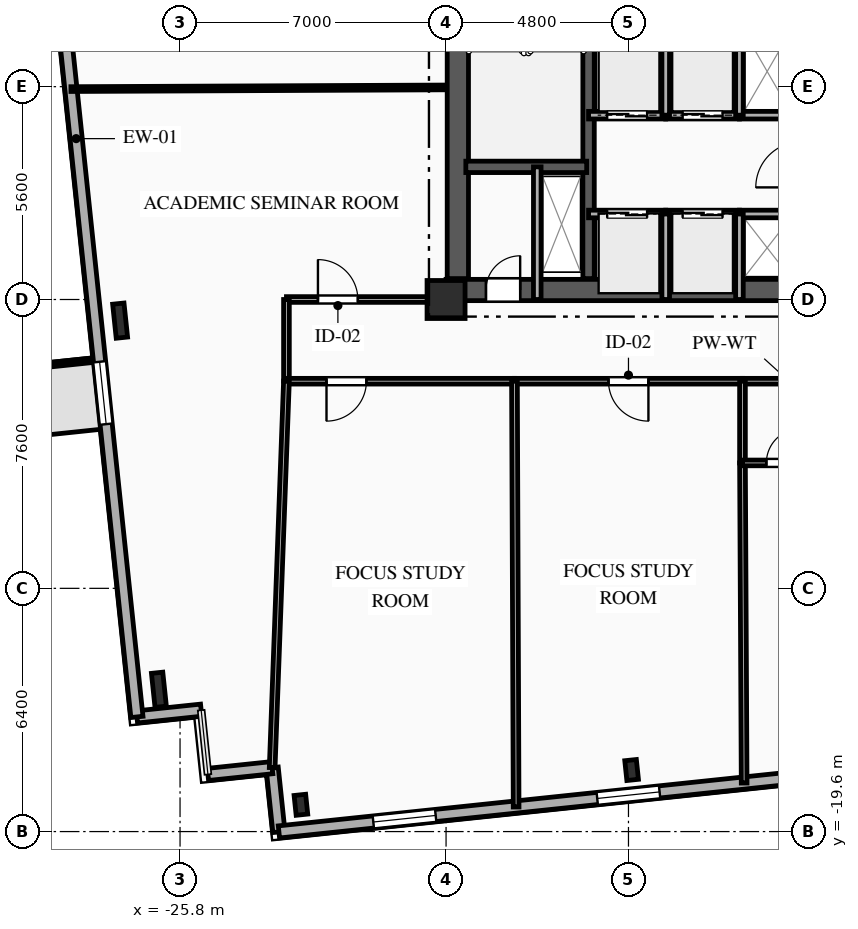
"""IFC4 building model, lengths in metres.
Left out: names, types, materials, properties, quantities, classifications, styles, units other than length and angle.
Written with IfcOpenShell. Run it as: python <this file> out.ifc"""

import sys

from ifc_helpers import new_model, si_unit, direction, frame, frame_2d, origin, origin_2d, place, context, subcontext, project, spatial, rectangle, i_section, extrude, element, fill, save


model = new_model("IFC4")
c1 = context("Model", 3, precision=1e-05, world=origin(), true_north=direction((0.0, 1.0)))
c2 = subcontext(c1, "Body", "Model", "MODEL_VIEW")
j1 = project(units=[si_unit("LENGTHUNIT", "METRE"), si_unit("PLANEANGLEUNIT", "RADIAN")], contexts=[c1])
p1 = place(None, origin())
s1 = spatial("IfcSite", under=j1, at=p1, CompositionType="ELEMENT")
p2 = place(p1, origin())
s2 = spatial("IfcBuilding", under=s1, at=p2, CompositionType="ELEMENT")
p3 = place(p2, frame((0.0, 0.0, 109.15)))
s3 = spatial("IfcBuildingStorey", under=s2, at=p3, CompositionType="ELEMENT", Elevation=109.15)
p4 = place(p3, frame((-18.8, -5.6, 0.0), z_axis=(0.0, 0.0, 1.0), x_axis=(1.0, 0.0, 0.0)))
e1 = element("IfcColumn", 1, at=p4, inside=s3, PredefinedType="COLUMN", context=c2, shape_type="SweptSolid", body=[
    extrude(rectangle(XDim=1.0, YDim=1.0, at=origin_2d()), origin(), (0.0, 0.0, 1.0), 3.35),
])
for number, where, z_axis, x_axis in (
    (2, (-22.619, -18.895, 0.0), (0.0, 0.0, 1.0), (0.995, 0.105, 0.0)),
    (3, (-13.917, -17.98, 0.0), (0.0, 0.0, 1.0), (0.995, 0.105, 0.0)),
):
    element("IfcColumn", number, at=place(p3, frame(where, z_axis=z_axis, x_axis=x_axis)), inside=s3, PredefinedType="COLUMN", context=c2, shape_type="SweptSolid", body=[
        extrude(i_section(OverallWidth=0.306, OverallDepth=0.524, WebThickness=0.021, FlangeThickness=0.04, FilletRadius=0.027, at=origin_2d()), origin(), (0.0, 0.0, 1.0), 3.35),
    ])
for number, where, z_axis, x_axis in (
    (4, (-27.377, -6.156, 0.0), (0.0, 0.0, 1.0), (0.995, 0.105, 0.0)),
    (5, (-26.356, -15.869, 0.0), (0.0, 0.0, 1.0), (0.995, 0.105, 0.0)),
):
    element("IfcColumn", number, at=place(p3, frame(where, z_axis=z_axis, x_axis=x_axis)), inside=s3, PredefinedType="COLUMN", context=c2, shape_type="SweptSolid", body=[
        extrude(i_section(OverallWidth=0.3, OverallDepth=0.9, WebThickness=0.019, FlangeThickness=0.035, FilletRadius=0.03, at=origin_2d()), origin(), (0.0, 0.0, 1.0), 3.35),
    ])
for number, where, z_axis, x_axis in (
    (6, (-23.198, -19.609, 0.0), (0.0, 0.0, 1.0), (-0.105, 0.995, 0.0)),
    (7, (-23.376, -17.919, 0.0), (0.0, 0.0, 1.0), (-0.995, -0.105, 0.0)),
):
    element("IfcWall", number, at=place(p3, frame(where, z_axis=z_axis, x_axis=x_axis)), inside=s3, PredefinedType="SOLIDWALL", context=c2, shape_type="SweptSolid", body=[
        extrude(rectangle(XDim=1.7, YDim=0.32, at=frame_2d((0.85, 0.0))), origin(), (0.0, 0.0, 1.0), 3.045),
    ])
p5 = place(p3, frame((-25.244, -16.406, 0.0), z_axis=(0.0, 0.0, 1.0), x_axis=(-0.994521177842, -0.104535289845, 0.0)))
e8 = element("IfcWall", 8, at=p5, inside=s3, PredefinedType="SOLIDWALL", context=c2, shape_type="SweptSolid", body=[
    extrude(rectangle(XDim=1.7, YDim=0.32, at=frame_2d((0.85, 0.0))), origin(), (0.0, 0.0, 1.0), 3.045),
])
p6 = place(p3, frame((-26.935, -16.583, 0.0), z_axis=(0.0, 0.0, 1.0), x_axis=(-0.104524887486, 0.994522271192, 0.0)))
e9 = element("IfcWall", 9, at=p6, inside=s3, PredefinedType="SOLIDWALL", context=c2, shape_type="SweptSolid", body=[
    extrude(rectangle(XDim=30.6, YDim=0.32, at=frame_2d((15.3, 0.0))), origin(), (0.0, 0.0, 1.0), 3.045),
])
p7 = place(p6, frame((7.746, 0.0, 0.85)))
e10 = element("IfcOpeningElement", 10, at=p7, cuts=e9, PredefinedType="OPENING", context=c2, shape_type="SweptSolid", body=[
    extrude(rectangle(XDim=1.65, YDim=1.85, at=frame_2d((0.825, 0.925))), frame((0.0, 0.17, 0.0), z_axis=(0.0, -1.0, 0.0), x_axis=(1.0, 0.0, 0.0)), (0.0, 0.0, 1.0), 0.34),
])
p8 = place(p6, frame((22.681, 0.0, 0.85)))
e11 = element("IfcOpeningElement", 11, at=p8, cuts=e9, PredefinedType="OPENING", context=c2, shape_type="SweptSolid", body=[
    extrude(rectangle(XDim=1.5, YDim=1.85, at=frame_2d((0.75, 0.925))), frame((0.0, 0.17, 0.0), z_axis=(0.0, -1.0, 0.0), x_axis=(1.0, 0.0, 0.0)), (0.0, 0.0, 1.0), 0.34),
])
p9 = place(p3, frame((30.307, -13.986, 0.0), z_axis=(0.0, 0.0, 1.0), x_axis=(-0.994521628355, -0.104531003701, 0.0)))
e12 = element("IfcWall", 12, at=p9, inside=s3, PredefinedType="SOLIDWALL", context=c2, shape_type="SweptSolid", body=[
    extrude(rectangle(XDim=53.8, YDim=0.32, at=frame_2d((26.9, 0.0))), origin(), (0.0, 0.0, 1.0), 3.045),
])
p10 = place(p9, frame((3.098, 0.0, 0.85)))
e13 = element("IfcOpeningElement", 13, at=p10, cuts=e12, PredefinedType="OPENING", context=c2, shape_type="SweptSolid", body=[
    extrude(rectangle(XDim=1.65, YDim=1.85, at=frame_2d((0.825, 0.925))), frame((0.0, 0.17, 0.0), z_axis=(0.0, -1.0, 0.0), x_axis=(1.0, 0.0, 0.0)), (0.0, 0.0, 1.0), 0.34),
])
p11 = place(p9, frame((9.302, 0.0, 0.85)))
e14 = element("IfcOpeningElement", 14, at=p11, cuts=e12, PredefinedType="OPENING", context=c2, shape_type="SweptSolid", body=[
    extrude(rectangle(XDim=1.65, YDim=1.85, at=frame_2d((0.825, 0.925))), frame((0.0, 0.17, 0.0), z_axis=(0.0, -1.0, 0.0), x_axis=(1.0, 0.0, 0.0)), (0.0, 0.0, 1.0), 0.34),
])
p12 = place(p9, frame((14.827, 0.0, 0.85)))
e15 = element("IfcOpeningElement", 15, at=p12, cuts=e12, PredefinedType="OPENING", context=c2, shape_type="SweptSolid", body=[
    extrude(rectangle(XDim=1.65, YDim=1.85, at=frame_2d((0.825, 0.925))), frame((0.0, 0.17, 0.0), z_axis=(0.0, -1.0, 0.0), x_axis=(1.0, 0.0, 0.0)), (0.0, 0.0, 1.0), 0.34),
])
p13 = place(p9, frame((23.078, 0.0, 0.85)))
e16 = element("IfcOpeningElement", 16, at=p13, cuts=e12, PredefinedType="OPENING", context=c2, shape_type="SweptSolid", body=[
    extrude(rectangle(XDim=2.2, YDim=1.85, at=frame_2d((1.1, 0.925))), frame((0.0, 0.17, 0.0), z_axis=(0.0, -1.0, 0.0), x_axis=(1.0, 0.0, 0.0)), (0.0, 0.0, 1.0), 0.34),
])
p14 = place(p9, frame((34.646, 0.0, 0.85)))
e17 = element("IfcOpeningElement", 17, at=p14, cuts=e12, PredefinedType="OPENING", context=c2, shape_type="SweptSolid", body=[
    extrude(rectangle(XDim=2.2, YDim=1.85, at=frame_2d((1.1, 0.925))), frame((0.0, 0.17, 0.0), z_axis=(0.0, -1.0, 0.0), x_axis=(1.0, 0.0, 0.0)), (0.0, 0.0, 1.0), 0.34),
])
p15 = place(p9, frame((43.728, 0.0, 0.85)))
e18 = element("IfcOpeningElement", 18, at=p15, cuts=e12, PredefinedType="OPENING", context=c2, shape_type="SweptSolid", body=[
    extrude(rectangle(XDim=1.65, YDim=1.85, at=frame_2d((0.825, 0.925))), frame((0.0, 0.17, 0.0), z_axis=(0.0, -1.0, 0.0), x_axis=(1.0, 0.0, 0.0)), (0.0, 0.0, 1.0), 0.34),
])
p16 = place(p9, frame((49.653, 0.0, 0.85)))
e19 = element("IfcOpeningElement", 19, at=p16, cuts=e12, PredefinedType="OPENING", context=c2, shape_type="SweptSolid", body=[
    extrude(rectangle(XDim=1.65, YDim=1.85, at=frame_2d((0.825, 0.925))), frame((0.0, 0.17, 0.0), z_axis=(0.0, -1.0, 0.0), x_axis=(1.0, 0.0, 0.0)), (0.0, 0.0, 1.0), 0.34),
])
p17 = place(p3, frame((-18.8, -5.35, 0.0), z_axis=(0.0, 0.0, 1.0), x_axis=(1.0, 0.0, 0.0)))
e20 = element("IfcWall", 20, at=p17, inside=s3, PredefinedType="SHEAR", context=c2, shape_type="SweptSolid", body=[
    extrude(rectangle(XDim=9.6, YDim=0.56, at=frame_2d((4.8, 0.0))), origin(), (0.0, 0.0, 1.0), 3.045),
])
p18 = place(p17, frame((1.05, 0.0, 0.0)))
e21 = element("IfcOpeningElement", 21, at=p18, cuts=e20, PredefinedType="OPENING", context=c2, shape_type="SweptSolid", body=[
    extrude(rectangle(XDim=0.9, YDim=2.1, at=frame_2d((0.45, 1.05))), frame((0.0, 0.29, 0.0), z_axis=(0.0, -1.0, 0.0), x_axis=(1.0, 0.0, 0.0)), (0.0, 0.0, 1.0), 0.58),
])
p19 = place(p3, frame((-18.49, -5.05, 0.0), z_axis=(0.0, 0.0, 1.0), x_axis=(0.0, 1.0, 0.0)))
e22 = element("IfcWall", 22, at=p19, inside=s3, PredefinedType="SHEAR", context=c2, shape_type="SweptSolid", body=[
    extrude(rectangle(XDim=10.1, YDim=0.56, at=frame_2d((5.05, 0.0))), origin(), (0.0, 0.0, 1.0), 3.045),
])
p20 = place(p3, frame((-15.05, -5.05, 0.0), z_axis=(0.0, 0.0, 1.0), x_axis=(0.0, 1.0, 0.0)))
e23 = element("IfcWall", 23, at=p20, inside=s3, PredefinedType="SHEAR", context=c2, shape_type="SweptSolid", body=[
    extrude(rectangle(XDim=10.1, YDim=0.3, at=frame_2d((5.05, 0.0))), origin(), (0.0, 0.0, 1.0), 3.045),
])
p21 = place(p3, frame((-18.28, -2.11, 0.0), z_axis=(0.0, 0.0, 1.0), x_axis=(1.0, 0.0, 0.0)))
e24 = element("IfcWall", 24, at=p21, inside=s3, PredefinedType="SHEAR", context=c2, shape_type="SweptSolid", body=[
    extrude(rectangle(XDim=3.18, YDim=0.3, at=frame_2d((1.59, 0.0))), origin(), (0.0, 0.0, 1.0), 3.045),
])
p22 = place(p3, frame((-16.4, -5.6, 0.0), z_axis=(0.0, 0.0, 1.0), x_axis=(0.0, 1.0, 0.0)))
e25 = element("IfcWall", 25, at=p22, inside=s3, PredefinedType="PARTITIONING", context=c2, shape_type="SweptSolid", body=[
    extrude(rectangle(XDim=3.49, YDim=0.2, at=frame_2d((1.745, 0.0))), origin(), (0.0, 0.0, 1.0), 3.045),
])
p23 = place(p3, frame((-15.05, -3.35, 0.0), z_axis=(0.0, 0.0, 1.0), x_axis=(1.0, 0.0, 0.0)))
e26 = element("IfcWall", 26, at=p23, inside=s3, PredefinedType="PARTITIONING", context=c2, shape_type="SweptSolid", body=[
    extrude(rectangle(XDim=2.03, YDim=0.2, at=frame_2d((1.015, 0.0))), origin(), (0.0, 0.0, 1.0), 3.045),
])
p24 = place(p23, frame((0.49, 0.0, 0.0)))
e27 = element("IfcOpeningElement", 27, at=p24, cuts=e26, PredefinedType="OPENING", context=c2, shape_type="SweptSolid", body=[
    extrude(rectangle(XDim=1.05, YDim=2.1, at=frame_2d((0.525, 1.05))), frame((0.0, 0.11, 0.0), z_axis=(0.0, -1.0, 0.0), x_axis=(1.0, 0.0, 0.0)), (0.0, 0.0, 1.0), 0.22),
])
p25 = place(p3, frame((-13.02, -3.35, 0.0), z_axis=(0.0, 0.0, 1.0), x_axis=(1.0, 0.0, 0.0)))
e28 = element("IfcWall", 28, at=p25, inside=s3, PredefinedType="PARTITIONING", context=c2, shape_type="SweptSolid", body=[
    extrude(rectangle(XDim=1.94, YDim=0.2, at=frame_2d((0.97, 0.0))), origin(), (0.0, 0.0, 1.0), 3.045),
])
p26 = place(p25, frame((0.445, 0.0, 0.0)))
e29 = element("IfcOpeningElement", 29, at=p26, cuts=e28, PredefinedType="OPENING", context=c2, shape_type="SweptSolid", body=[
    extrude(rectangle(XDim=1.05, YDim=2.1, at=frame_2d((0.525, 1.05))), frame((0.0, 0.11, 0.0), z_axis=(0.0, -1.0, 0.0), x_axis=(1.0, 0.0, 0.0)), (0.0, 0.0, 1.0), 0.22),
])
p27 = place(p3, frame((-11.08, -3.35, 0.0), z_axis=(0.0, 0.0, 1.0), x_axis=(1.0, 0.0, 0.0)))
e30 = element("IfcWall", 30, at=p27, inside=s3, PredefinedType="PARTITIONING", context=c2, shape_type="SweptSolid", body=[
    extrude(rectangle(XDim=1.88, YDim=0.2, at=frame_2d((0.94, 0.0))), origin(), (0.0, 0.0, 1.0), 2.76),
])
p28 = place(p3, frame((-13.02, -0.75, 0.0), z_axis=(0.0, 0.0, 1.0), x_axis=(-1.0, 0.0, 0.0)))
e31 = element("IfcWall", 31, at=p28, inside=s3, PredefinedType="PARTITIONING", context=c2, shape_type="SweptSolid", body=[
    extrude(rectangle(XDim=2.03, YDim=0.2, at=frame_2d((1.015, 0.0))), origin(), (0.0, 0.0, 1.0), 3.045),
])
p29 = place(p28, frame((0.49, 0.0, 0.0)))
e32 = element("IfcOpeningElement", 32, at=p29, cuts=e31, PredefinedType="OPENING", context=c2, shape_type="SweptSolid", body=[
    extrude(rectangle(XDim=1.05, YDim=2.1, at=frame_2d((0.525, 1.05))), frame((0.0, 0.11, 0.0), z_axis=(0.0, -1.0, 0.0), x_axis=(1.0, 0.0, 0.0)), (0.0, 0.0, 1.0), 0.22),
])
p30 = place(p3, frame((-11.08, -0.75, 0.0), z_axis=(0.0, 0.0, 1.0), x_axis=(-1.0, 0.0, 0.0)))
e33 = element("IfcWall", 33, at=p30, inside=s3, PredefinedType="PARTITIONING", context=c2, shape_type="SweptSolid", body=[
    extrude(rectangle(XDim=1.94, YDim=0.2, at=frame_2d((0.97, 0.0))), origin(), (0.0, 0.0, 1.0), 3.045),
])
p31 = place(p30, frame((0.445, 0.0, 0.0)))
e34 = element("IfcOpeningElement", 34, at=p31, cuts=e33, PredefinedType="OPENING", context=c2, shape_type="SweptSolid", body=[
    extrude(rectangle(XDim=1.05, YDim=2.1, at=frame_2d((0.525, 1.05))), frame((0.0, 0.11, 0.0), z_axis=(0.0, -1.0, 0.0), x_axis=(1.0, 0.0, 0.0)), (0.0, 0.0, 1.0), 0.22),
])
p32 = place(p3, frame((-9.2, -0.75, 0.0), z_axis=(0.0, 0.0, 1.0), x_axis=(-1.0, 0.0, 0.0)))
e35 = element("IfcWall", 35, at=p32, inside=s3, PredefinedType="PARTITIONING", context=c2, shape_type="SweptSolid", body=[
    extrude(rectangle(XDim=1.88, YDim=0.2, at=frame_2d((0.94, 0.0))), origin(), (0.0, 0.0, 1.0), 3.045),
])
for number, where, z_axis, x_axis in (
    (36, (-13.02, -5.6, 0.0), (0.0, 0.0, 1.0), (0.0, 1.0, 0.0)),
    (37, (-11.08, -5.6, 0.0), (0.0, 0.0, 1.0), (0.0, 1.0, 0.0)),
):
    element("IfcWall", number, at=place(p3, frame(where, z_axis=z_axis, x_axis=x_axis)), inside=s3, PredefinedType="PARTITIONING", context=c2, shape_type="SweptSolid", body=[
        extrude(rectangle(XDim=2.25, YDim=0.2, at=frame_2d((1.125, 0.0))), origin(), (0.0, 0.0, 1.0), 3.045),
    ])
for number, where, z_axis, x_axis in (
    (38, (-13.02, -0.75, 0.0), (0.0, 0.0, 1.0), (0.0, 1.0, 0.0)),
    (39, (-11.08, -0.75, 0.0), (0.0, 0.0, 1.0), (0.0, 1.0, 0.0)),
):
    element("IfcWall", number, at=place(p3, frame(where, z_axis=z_axis, x_axis=x_axis)), inside=s3, PredefinedType="PARTITIONING", context=c2, shape_type="SweptSolid", body=[
        extrude(rectangle(XDim=2.3, YDim=0.2, at=frame_2d((1.15, 0.0))), origin(), (0.0, 0.0, 1.0), 3.045),
    ])
p33 = place(p3, frame((-23.0, -5.6, 0.0), z_axis=(0.0, 0.0, 1.0), x_axis=(1.0, 0.0, 0.0)))
e40 = element("IfcWall", 40, at=p33, inside=s3, PredefinedType="PARTITIONING", context=c2, shape_type="SweptSolid", body=[
    extrude(rectangle(XDim=4.2, YDim=0.15, at=frame_2d((2.1, 0.0))), origin(), (0.0, 0.0, 1.0), 3.045),
])
p34 = place(p33, frame((0.829, 0.0, 0.0)))
e41 = element("IfcOpeningElement", 41, at=p34, cuts=e40, PredefinedType="OPENING", context=c2, shape_type="SweptSolid", body=[
    extrude(rectangle(XDim=1.05, YDim=2.15, at=frame_2d((0.525, 1.075))), frame((0.0, 0.085, 0.0), z_axis=(0.0, -1.0, 0.0), x_axis=(1.0, 0.0, 0.0)), (0.0, 0.0, 1.0), 0.17),
])
p35 = place(p3, frame((-23.0, -7.75, 0.0), z_axis=(0.0, 0.0, 1.0), x_axis=(0.0, 1.0, 0.0)))
e42 = element("IfcWall", 42, at=p35, inside=s3, PredefinedType="PARTITIONING", context=c2, shape_type="SweptSolid", body=[
    extrude(rectangle(XDim=2.15, YDim=0.15, at=frame_2d((1.075, 0.0))), origin(), (0.0, 0.0, 1.0), 2.7),
])
p36 = place(p3, frame((-17.0, -7.75, 0.0), z_axis=(0.0, 0.0, 1.0), x_axis=(-1.0, 0.0, 0.0)))
e43 = element("IfcWall", 43, at=p36, inside=s3, PredefinedType="PARTITIONING", context=c2, shape_type="SweptSolid", body=[
    extrude(rectangle(XDim=6.0, YDim=0.15, at=frame_2d((3.0, 0.0))), origin(), (0.0, 0.0, 1.0), 3.045),
])
p37 = place(p36, frame((3.896, 0.0, 0.0)))
e44 = element("IfcOpeningElement", 44, at=p37, cuts=e43, PredefinedType="OPENING", context=c2, shape_type="SweptSolid", body=[
    extrude(rectangle(XDim=1.05, YDim=2.15, at=frame_2d((0.525, 1.075))), frame((0.0, 0.085, 0.0), z_axis=(0.0, -1.0, 0.0), x_axis=(1.0, 0.0, 0.0)), (0.0, 0.0, 1.0), 0.17),
])
p38 = place(p3, frame((-11.0, -7.75, 0.0), z_axis=(0.0, 0.0, 1.0), x_axis=(-1.0, 0.0, 0.0)))
e45 = element("IfcWall", 45, at=p38, inside=s3, PredefinedType="PARTITIONING", context=c2, shape_type="SweptSolid", body=[
    extrude(rectangle(XDim=6.0, YDim=0.15, at=frame_2d((3.0, 0.0))), origin(), (0.0, 0.0, 1.0), 3.045),
])
p39 = place(p38, frame((2.475, 0.0, 0.0)))
e46 = element("IfcOpeningElement", 46, at=p39, cuts=e45, PredefinedType="OPENING", context=c2, shape_type="SweptSolid", body=[
    extrude(rectangle(XDim=1.05, YDim=2.15, at=frame_2d((0.525, 1.075))), frame((0.0, 0.085, 0.0), z_axis=(0.0, -1.0, 0.0), x_axis=(1.0, 0.0, 0.0)), (0.0, 0.0, 1.0), 0.17),
])
p40 = place(p3, frame((-8.55, -7.75, 0.0), z_axis=(0.0, 0.0, 1.0), x_axis=(-1.0, 0.0, 0.0)))
e47 = element("IfcWall", 47, at=p40, inside=s3, PredefinedType="PLUMBINGWALL", context=c2, shape_type="SweptSolid", body=[
    extrude(rectangle(XDim=2.45, YDim=0.15, at=frame_2d((1.225, 0.0))), origin(), (0.0, 0.0, 1.0), 3.045),
])
p41 = place(p3, frame((-28.671, -0.064, 0.0), z_axis=(0.0, 0.0, 1.0), x_axis=(0.999990089865, 0.004451985263, 0.0)))
e48 = element("IfcWall", 48, at=p41, inside=s3, PredefinedType="PARTITIONING", context=c2, shape_type="SweptSolid", body=[
    extrude(rectangle(XDim=9.871, YDim=0.125, at=frame_2d((4.936, 0.0))), origin(), (0.0, 0.0, 1.0), 3.045),
])
p42 = place(p3, frame((-23.0, -7.75, 0.0), z_axis=(0.0, 0.0, 1.0), x_axis=(-0.036924695214, -0.999318050914, 0.0)))
e49 = element("IfcWall", 49, at=p42, inside=s3, PredefinedType="PARTITIONING", context=c2, shape_type="SweptSolid", body=[
    extrude(rectangle(XDim=10.176, YDim=0.15, at=frame_2d((5.088, 0.0))), origin(), (0.0, 0.0, 1.0), 3.045),
])
p43 = place(p3, frame((-17.0, -7.75, 0.0), z_axis=(0.0, 0.0, 1.0), x_axis=(0.003922478487, -0.999992307052, 0.0)))
e50 = element("IfcWall", 50, at=p43, inside=s3, PredefinedType="PARTITIONING", context=c2, shape_type="SweptSolid", body=[
    extrude(rectangle(XDim=11.203, YDim=0.15, at=frame_2d((5.602, 0.0))), origin(), (0.0, 0.0, 1.0), 3.045),
])
p44 = place(p3, frame((-11.0, -9.9, 0.0), z_axis=(0.0, 0.0, 1.0), x_axis=(0.005217320294, -0.999986389692, 0.0)))
e51 = element("IfcWall", 51, at=p44, inside=s3, PredefinedType="PARTITIONING", context=c2, shape_type="SweptSolid", body=[
    extrude(rectangle(XDim=8.423, YDim=0.15, at=frame_2d((4.211, 0.0))), origin(), (0.0, 0.0, 1.0), 3.045),
])
p45 = place(p3, frame((-11.0, -7.75, 0.0), z_axis=(0.0, 0.0, 1.0), x_axis=(0.0, -1.0, 0.0)))
e52 = element("IfcWall", 52, at=p45, inside=s3, PredefinedType="PLUMBINGWALL", context=c2, shape_type="SweptSolid", body=[
    extrude(rectangle(XDim=2.15, YDim=0.15, at=frame_2d((1.075, 0.0))), origin(), (0.0, 0.0, 1.0), 3.045),
])
p46 = place(p3, frame((-11.0, -9.9, 0.0), z_axis=(0.0, 0.0, 1.0), x_axis=(1.0, 0.0, 0.0)))
e53 = element("IfcWall", 53, at=p46, inside=s3, PredefinedType="PLUMBINGWALL", context=c2, shape_type="SweptSolid", body=[
    extrude(rectangle(XDim=2.45, YDim=0.15, at=frame_2d((1.225, 0.0))), origin(), (0.0, 0.0, 1.0), 3.045),
])
p47 = place(p46, frame((0.629, 0.0, 0.0)))
e54 = element("IfcOpeningElement", 54, at=p47, cuts=e53, PredefinedType="OPENING", context=c2, shape_type="SweptSolid", body=[
    extrude(rectangle(XDim=0.9, YDim=2.1, at=frame_2d((0.45, 1.05))), frame((0.0, 0.085, 0.0), z_axis=(0.0, -1.0, 0.0), x_axis=(1.0, 0.0, 0.0)), (0.0, 0.0, 1.0), 0.17),
])
p48 = place(p7, origin())
e55 = element("IfcWindow", 55, at=p48, inside=s3, PartitioningType="SINGLE_PANEL", PredefinedType="WINDOW", context=c2, shape_type="SweptSolid", body=[
    extrude(rectangle(XDim=1.65, YDim=1.85, at=frame_2d((0.825, 0.925))), frame((0.0, 0.03, 0.0), z_axis=(0.0, -1.0, 0.0), x_axis=(1.0, 0.0, 0.0)), (0.0, 0.0, 1.0), 0.06),
])
fill(e10, e55)
p49 = place(p15, origin())
e56 = element("IfcWindow", 56, at=p49, inside=s3, PartitioningType="SINGLE_PANEL", PredefinedType="WINDOW", context=c2, shape_type="SweptSolid", body=[
    extrude(rectangle(XDim=1.65, YDim=1.85, at=frame_2d((0.825, 0.925))), frame((0.0, 0.03, 0.0), z_axis=(0.0, -1.0, 0.0), x_axis=(1.0, 0.0, 0.0)), (0.0, 0.0, 1.0), 0.06),
])
fill(e18, e56)
p50 = place(p16, origin())
e57 = element("IfcWindow", 57, at=p50, inside=s3, PartitioningType="SINGLE_PANEL", PredefinedType="WINDOW", context=c2, shape_type="SweptSolid", body=[
    extrude(rectangle(XDim=1.65, YDim=1.85, at=frame_2d((0.825, 0.925))), frame((0.0, 0.03, 0.0), z_axis=(0.0, -1.0, 0.0), x_axis=(1.0, 0.0, 0.0)), (0.0, 0.0, 1.0), 0.06),
])
fill(e19, e57)
p51 = place(p18, origin())
e58 = element("IfcDoor", 58, at=p51, inside=s3, OperationType="SINGLE_SWING_RIGHT", PredefinedType="DOOR", context=c2, shape_type="SweptSolid", body=[
    extrude(rectangle(XDim=0.9, YDim=2.1, at=frame_2d((0.45, 1.05))), frame((0.0, 0.025, 0.0), z_axis=(0.0, -1.0, 0.0), x_axis=(1.0, 0.0, 0.0)), (0.0, 0.0, 1.0), 0.05),
])
fill(e21, e58)
p52 = place(p24, origin())
e59 = element("IfcDoor", 59, at=p52, inside=s3, OperationType="DOUBLE_DOOR_SLIDING", PredefinedType="DOOR", context=c2, shape_type="SweptSolid", body=[
    extrude(rectangle(XDim=1.05, YDim=2.1, at=frame_2d((0.525, 1.05))), frame((0.0, 0.025, 0.0), z_axis=(0.0, -1.0, 0.0), x_axis=(1.0, 0.0, 0.0)), (0.0, 0.0, 1.0), 0.05),
])
fill(e27, e59)
p53 = place(p26, origin())
e60 = element("IfcDoor", 60, at=p53, inside=s3, OperationType="DOUBLE_DOOR_SLIDING", PredefinedType="DOOR", context=c2, shape_type="SweptSolid", body=[
    extrude(rectangle(XDim=1.05, YDim=2.1, at=frame_2d((0.525, 1.05))), frame((0.0, 0.025, 0.0), z_axis=(0.0, -1.0, 0.0), x_axis=(1.0, 0.0, 0.0)), (0.0, 0.0, 1.0), 0.05),
])
fill(e29, e60)
p54 = place(p29, origin())
e61 = element("IfcDoor", 61, at=p54, inside=s3, OperationType="DOUBLE_DOOR_SLIDING", PredefinedType="DOOR", context=c2, shape_type="SweptSolid", body=[
    extrude(rectangle(XDim=1.05, YDim=2.1, at=frame_2d((0.525, 1.05))), frame((0.0, 0.025, 0.0), z_axis=(0.0, -1.0, 0.0), x_axis=(1.0, 0.0, 0.0)), (0.0, 0.0, 1.0), 0.05),
])
fill(e32, e61)
p55 = place(p31, origin())
e62 = element("IfcDoor", 62, at=p55, inside=s3, OperationType="DOUBLE_DOOR_SLIDING", PredefinedType="DOOR", context=c2, shape_type="SweptSolid", body=[
    extrude(rectangle(XDim=1.05, YDim=2.1, at=frame_2d((0.525, 1.05))), frame((0.0, 0.025, 0.0), z_axis=(0.0, -1.0, 0.0), x_axis=(1.0, 0.0, 0.0)), (0.0, 0.0, 1.0), 0.05),
])
fill(e34, e62)
p56 = place(p34, origin())
e63 = element("IfcDoor", 63, at=p56, inside=s3, OperationType="SINGLE_SWING_LEFT", PredefinedType="DOOR", context=c2, shape_type="SweptSolid", body=[
    extrude(rectangle(XDim=1.05, YDim=2.15, at=frame_2d((0.525, 1.075))), frame((0.0, 0.025, 0.0), z_axis=(0.0, -1.0, 0.0), x_axis=(1.0, 0.0, 0.0)), (0.0, 0.0, 1.0), 0.05),
])
fill(e41, e63)
p57 = place(p37, origin())
e64 = element("IfcDoor", 64, at=p57, inside=s3, OperationType="SINGLE_SWING_RIGHT", PredefinedType="DOOR", context=c2, shape_type="SweptSolid", body=[
    extrude(rectangle(XDim=1.05, YDim=2.15, at=frame_2d((0.525, 1.075))), frame((0.0, 0.025, 0.0), z_axis=(0.0, -1.0, 0.0), x_axis=(1.0, 0.0, 0.0)), (0.0, 0.0, 1.0), 0.05),
])
fill(e44, e64)
p58 = place(p39, origin())
e65 = element("IfcDoor", 65, at=p58, inside=s3, OperationType="SINGLE_SWING_LEFT", PredefinedType="DOOR", context=c2, shape_type="SweptSolid", body=[
    extrude(rectangle(XDim=1.05, YDim=2.15, at=frame_2d((0.525, 1.075))), frame((0.0, 0.025, 0.0), z_axis=(0.0, -1.0, 0.0), x_axis=(1.0, 0.0, 0.0)), (0.0, 0.0, 1.0), 0.05),
])
fill(e46, e65)
p59 = place(p47, origin())
e66 = element("IfcDoor", 66, at=p59, inside=s3, OperationType="SINGLE_SWING_RIGHT", PredefinedType="DOOR", context=c2, shape_type="SweptSolid", body=[
    extrude(rectangle(XDim=0.9, YDim=2.1, at=frame_2d((0.45, 1.05))), frame((0.0, 0.025, 0.0), z_axis=(0.0, -1.0, 0.0), x_axis=(1.0, 0.0, 0.0)), (0.0, 0.0, 1.0), 0.05),
])
fill(e54, e66)
save(model, sys.argv[1])
